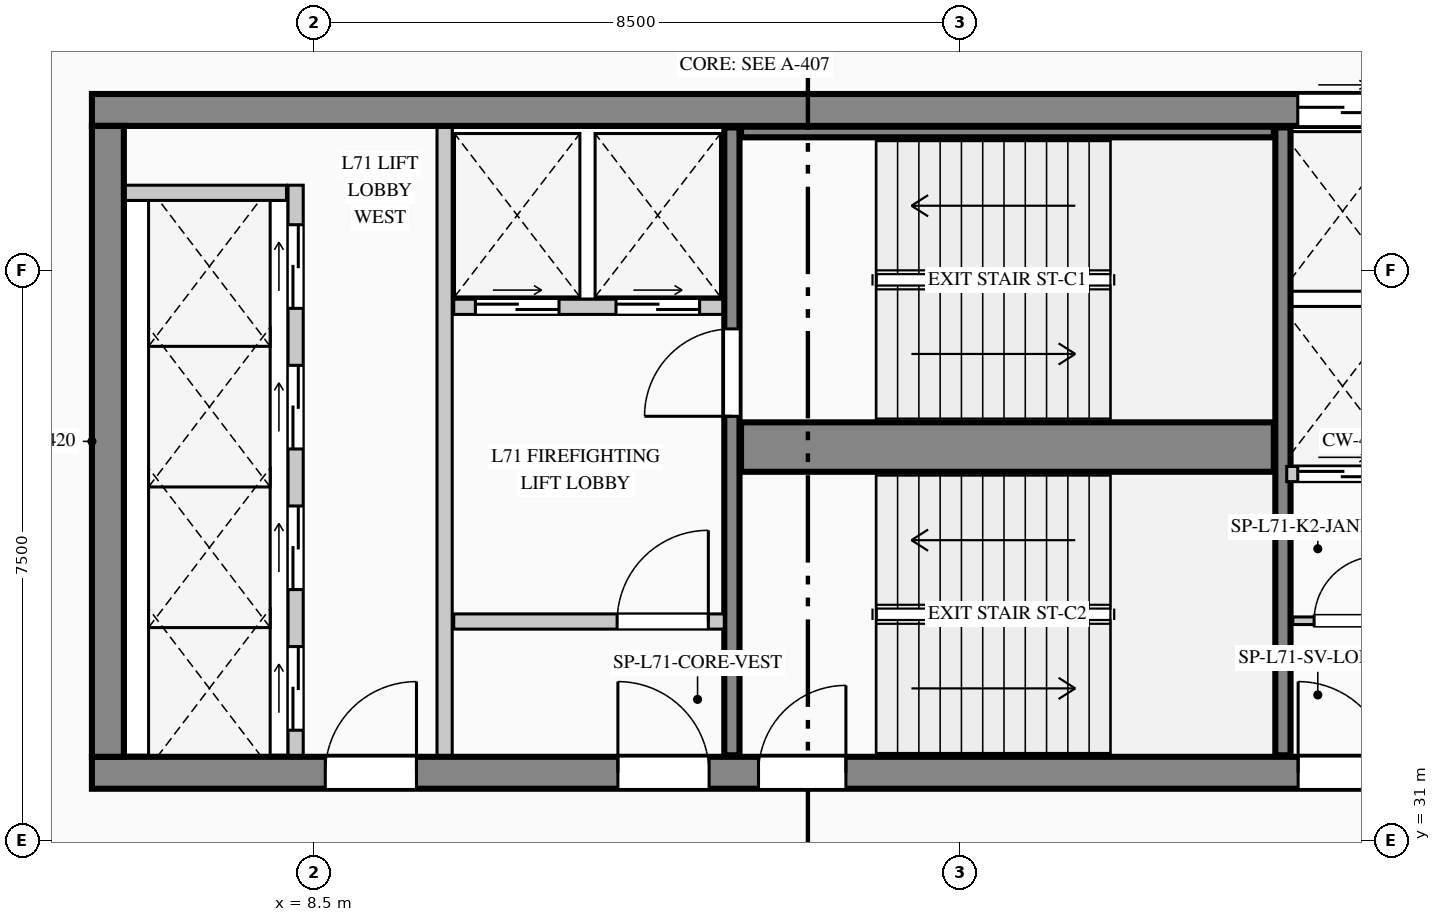
"""IFC4 building model, lengths in metres.
Left out: names, types, materials, properties, quantities, classifications, styles, units other than length and angle.
Written with IfcOpenShell. Run it as: python <this file> out.ifc"""

import sys

from ifc_helpers import new_model, si_unit, direction, frame, frame_2d, origin, place, context, subcontext, project, spatial, rectangle, extrude, element, fill, save


model = new_model("IFC4")
c1 = context("Model", 3, precision=1e-05, world=origin(), true_north=direction((0.0, 1.0)))
c2 = subcontext(c1, "Body", "Model", "MODEL_VIEW")
j1 = project(units=[si_unit("LENGTHUNIT", "METRE"), si_unit("PLANEANGLEUNIT", "RADIAN")], contexts=[c1])
p1 = place(None, origin())
s1 = spatial("IfcSite", under=j1, at=p1, CompositionType="ELEMENT")
p2 = place(p1, origin())
s2 = spatial("IfcBuilding", under=s1, at=p2, CompositionType="ELEMENT")
p3 = place(p2, frame((0.0, 0.0, 296.2)))
s3 = spatial("IfcBuildingStorey", under=s2, at=p3, CompositionType="ELEMENT", Elevation=296.2)
p4 = place(p3, frame((5.58, 40.61, 0.0), z_axis=(0.0, 0.0, 1.0), x_axis=(1.0, 0.0, 0.0)))
e1 = element("IfcWall", 1, at=p4, inside=s3, PredefinedType="SHEAR", context=c2, shape_type="SweptSolid", body=[
    extrude(rectangle(XDim=17.69, YDim=0.42, at=frame_2d((8.845, 0.0))), origin(), (0.0, 0.0, 1.0), 3.95),
])
p5 = place(p4, frame((15.865, 0.0, 0.0)))
e2 = element("IfcOpeningElement", 2, at=p5, cuts=e1, PredefinedType="OPENING", context=c2, shape_type="SweptSolid", body=[
    extrude(rectangle(XDim=1.18, YDim=2.25, at=frame_2d((0.59, 1.125))), frame((0.0, 0.22, 0.0), z_axis=(0.0, -1.0, 0.0), x_axis=(1.0, 0.0, 0.0)), (0.0, 0.0, 1.0), 0.44),
])
p6 = place(p3, frame((5.58, 31.89, 0.0), z_axis=(0.0, 0.0, 1.0), x_axis=(1.0, 0.0, 0.0)))
e3 = element("IfcWall", 3, at=p6, inside=s3, PredefinedType="SHEAR", context=c2, shape_type="SweptSolid", body=[
    extrude(rectangle(XDim=17.69, YDim=0.42, at=frame_2d((8.845, 0.0))), origin(), (0.0, 0.0, 1.0), 3.95),
])
p7 = place(p6, frame((3.07, 0.0, 0.0)))
e4 = element("IfcOpeningElement", 4, at=p7, cuts=e3, PredefinedType="OPENING", context=c2, shape_type="SweptSolid", body=[
    extrude(rectangle(XDim=1.2, YDim=2.2, at=frame_2d((0.6, 1.1))), frame((0.0, 0.22, 0.0), z_axis=(0.0, -1.0, 0.0), x_axis=(1.0, 0.0, 0.0)), (0.0, 0.0, 1.0), 0.44),
])
p8 = place(p6, frame((6.92, 0.0, 0.0)))
e5 = element("IfcOpeningElement", 5, at=p8, cuts=e3, PredefinedType="OPENING", context=c2, shape_type="SweptSolid", body=[
    extrude(rectangle(XDim=1.2, YDim=2.2, at=frame_2d((0.6, 1.1))), frame((0.0, 0.22, 0.0), z_axis=(0.0, -1.0, 0.0), x_axis=(1.0, 0.0, 0.0)), (0.0, 0.0, 1.0), 0.44),
])
p9 = place(p6, frame((8.77, 0.0, 0.0)))
e6 = element("IfcOpeningElement", 6, at=p9, cuts=e3, PredefinedType="OPENING", context=c2, shape_type="SweptSolid", body=[
    extrude(rectangle(XDim=1.15, YDim=2.2, at=frame_2d((0.575, 1.1))), frame((0.0, 0.22, 0.0), z_axis=(0.0, -1.0, 0.0), x_axis=(1.0, 0.0, 0.0)), (0.0, 0.0, 1.0), 0.44),
])
p10 = place(p6, frame((15.87, 0.0, 0.0)))
e7 = element("IfcOpeningElement", 7, at=p10, cuts=e3, PredefinedType="OPENING", context=c2, shape_type="SweptSolid", body=[
    extrude(rectangle(XDim=1.2, YDim=2.2, at=frame_2d((0.6, 1.1))), frame((0.0, 0.22, 0.0), z_axis=(0.0, -1.0, 0.0), x_axis=(1.0, 0.0, 0.0)), (0.0, 0.0, 1.0), 0.44),
])
p11 = place(p3, frame((5.79, 32.1, 0.0), z_axis=(0.0, 0.0, 1.0), x_axis=(0.0, 1.0, 0.0)))
e8 = element("IfcWall", 8, at=p11, inside=s3, PredefinedType="SHEAR", context=c2, shape_type="SweptSolid", body=[
    extrude(rectangle(XDim=8.3, YDim=0.42, at=frame_2d((4.15, 0.0))), origin(), (0.0, 0.0, 1.0), 3.95),
])
p12 = place(p3, frame((14.0, 32.12, 0.0), z_axis=(0.0, 0.0, 1.0), x_axis=(0.0, 1.0, 0.0)))
e9 = element("IfcWall", 9, at=p12, inside=s3, PredefinedType="SHEAR", context=c2, shape_type="SweptSolid", body=[
    extrude(rectangle(XDim=8.26, YDim=0.2, at=frame_2d((4.13, 0.0))), origin(), (0.0, 0.0, 1.0), 3.95),
])
p13 = place(p12, frame((4.46, 0.0, 0.0)))
e10 = element("IfcOpeningElement", 10, at=p13, cuts=e9, PredefinedType="OPENING", context=c2, shape_type="SweptSolid", body=[
    extrude(rectangle(XDim=1.15, YDim=2.2, at=frame_2d((0.575, 1.1))), frame((0.0, 0.11, 0.0), z_axis=(0.0, -1.0, 0.0), x_axis=(1.0, 0.0, 0.0)), (0.0, 0.0, 1.0), 0.22),
])
p14 = place(p3, frame((14.12, 36.175, 0.0), z_axis=(0.0, 0.0, 1.0), x_axis=(1.0, 0.0, 0.0)))
e11 = element("IfcWall", 11, at=p14, inside=s3, PredefinedType="SHEAR", context=c2, shape_type="SweptSolid", body=[
    extrude(rectangle(XDim=7.01, YDim=0.65, at=frame_2d((3.505, 0.0))), origin(), (0.0, 0.0, 1.0), 3.95),
])
p15 = place(p3, frame((21.25, 32.12, 0.0), z_axis=(0.0, 0.0, 1.0), x_axis=(0.0, 1.0, 0.0)))
e12 = element("IfcWall", 12, at=p15, inside=s3, PredefinedType="SHEAR", context=c2, shape_type="SweptSolid", body=[
    extrude(rectangle(XDim=8.26, YDim=0.2, at=frame_2d((4.13, 0.0))), origin(), (0.0, 0.0, 1.0), 3.95),
])
p16 = place(p3, frame((14.12, 40.32, 0.0), z_axis=(0.0, 0.0, 1.0), x_axis=(1.0, 0.0, 0.0)))
e13 = element("IfcWall", 13, at=p16, inside=s3, PredefinedType="SHEAR", context=c2, shape_type="SweptSolid", body=[
    extrude(rectangle(XDim=7.01, YDim=0.14, at=frame_2d((3.505, 0.0))), origin(), (0.0, 0.0, 1.0), 3.95),
])
p17 = place(p3, frame((5.6, 4.32, 0.0), z_axis=(0.0, 0.0, 1.0), x_axis=(-0.075839920993, 0.997120006009, 0.0)))
e14 = element("IfcWall", 14, at=p17, inside=s3, PredefinedType="STANDARD", context=c2, shape_type="SweptSolid", body=[
    extrude(rectangle(XDim=37.468, YDim=0.24, at=frame_2d((18.734, 0.0))), origin(), (0.0, 0.0, 1.0), 3.7),
])
p18 = place(p17, frame((23.154, 0.0, 0.9)))
e15 = element("IfcOpeningElement", 15, at=p18, cuts=e14, PredefinedType="OPENING", context=c2, shape_type="SweptSolid", body=[
    extrude(rectangle(XDim=1.65, YDim=1.95, at=frame_2d((0.825, 0.975))), frame((0.0, 0.13, 0.0), z_axis=(0.0, -1.0, 0.0), x_axis=(1.0, 0.0, 0.0)), (0.0, 0.0, 1.0), 0.26),
])
p19 = place(p3, frame((8.26, 32.12, 0.0), z_axis=(0.0, 0.0, 1.0), x_axis=(0.0, 1.0, 0.0)))
e16 = element("IfcWall", 16, at=p19, inside=s3, PredefinedType="PARTITIONING", context=c2, shape_type="SweptSolid", body=[
    extrude(rectangle(XDim=7.5, YDim=0.2, at=frame_2d((3.75, 0.0))), origin(), (0.0, 0.0, 1.0), 3.7),
])
p20 = place(p19, frame((0.33, 0.0, 0.0)))
e17 = element("IfcOpeningElement", 17, at=p20, cuts=e16, PredefinedType="OPENING", context=c2, shape_type="SweptSolid", body=[
    extrude(rectangle(XDim=1.1, YDim=2.2, at=frame_2d((0.55, 1.1))), frame((0.0, 0.11, 0.0), z_axis=(0.0, -1.0, 0.0), x_axis=(1.0, 0.0, 0.0)), (0.0, 0.0, 1.0), 0.22),
])
p21 = place(p19, frame((2.18, 0.0, 0.0)))
e18 = element("IfcOpeningElement", 18, at=p21, cuts=e16, PredefinedType="OPENING", context=c2, shape_type="SweptSolid", body=[
    extrude(rectangle(XDim=1.1, YDim=2.2, at=frame_2d((0.55, 1.1))), frame((0.0, 0.11, 0.0), z_axis=(0.0, -1.0, 0.0), x_axis=(1.0, 0.0, 0.0)), (0.0, 0.0, 1.0), 0.22),
])
p22 = place(p19, frame((4.03, 0.0, 0.0)))
e19 = element("IfcOpeningElement", 19, at=p22, cuts=e16, PredefinedType="OPENING", context=c2, shape_type="SweptSolid", body=[
    extrude(rectangle(XDim=1.1, YDim=2.2, at=frame_2d((0.55, 1.1))), frame((0.0, 0.11, 0.0), z_axis=(0.0, -1.0, 0.0), x_axis=(1.0, 0.0, 0.0)), (0.0, 0.0, 1.0), 0.22),
])
p23 = place(p19, frame((5.88, 0.0, 0.0)))
e20 = element("IfcOpeningElement", 20, at=p23, cuts=e16, PredefinedType="OPENING", context=c2, shape_type="SweptSolid", body=[
    extrude(rectangle(XDim=1.1, YDim=2.2, at=frame_2d((0.55, 1.1))), frame((0.0, 0.11, 0.0), z_axis=(0.0, -1.0, 0.0), x_axis=(1.0, 0.0, 0.0)), (0.0, 0.0, 1.0), 0.22),
])
p24 = place(p3, frame((6.02, 39.52, 0.0), z_axis=(0.0, 0.0, 1.0), x_axis=(1.0, 0.0, 0.0)))
e21 = element("IfcWall", 21, at=p24, inside=s3, PredefinedType="PARTITIONING", context=c2, shape_type="SweptSolid", body=[
    extrude(rectangle(XDim=2.12, YDim=0.2, at=frame_2d((1.06, 0.0))), origin(), (0.0, 0.0, 1.0), 3.7),
])
p25 = place(p3, frame((10.22, 32.12, 0.0), z_axis=(0.0, 0.0, 1.0), x_axis=(0.0, 1.0, 0.0)))
e22 = element("IfcWall", 22, at=p25, inside=s3, PredefinedType="PARTITIONING", context=c2, shape_type="SweptSolid", body=[
    extrude(rectangle(XDim=8.26, YDim=0.2, at=frame_2d((4.13, 0.0))), origin(), (0.0, 0.0, 1.0), 3.7),
])
p26 = place(p3, frame((10.34, 38.02, 0.0), z_axis=(0.0, 0.0, 1.0), x_axis=(1.0, 0.0, 0.0)))
e23 = element("IfcWall", 23, at=p26, inside=s3, PredefinedType="PARTITIONING", context=c2, shape_type="SweptSolid", body=[
    extrude(rectangle(XDim=3.54, YDim=0.2, at=frame_2d((1.77, 0.0))), origin(), (0.0, 0.0, 1.0), 3.7),
])
p27 = place(p26, frame((0.285, 0.0, 0.0)))
e24 = element("IfcOpeningElement", 24, at=p27, cuts=e23, PredefinedType="OPENING", context=c2, shape_type="SweptSolid", body=[
    extrude(rectangle(XDim=1.1, YDim=2.2, at=frame_2d((0.55, 1.1))), frame((0.0, 0.11, 0.0), z_axis=(0.0, -1.0, 0.0), x_axis=(1.0, 0.0, 0.0)), (0.0, 0.0, 1.0), 0.22),
])
p28 = place(p26, frame((2.135, 0.0, 0.0)))
e25 = element("IfcOpeningElement", 25, at=p28, cuts=e23, PredefinedType="OPENING", context=c2, shape_type="SweptSolid", body=[
    extrude(rectangle(XDim=1.1, YDim=2.2, at=frame_2d((0.55, 1.1))), frame((0.0, 0.11, 0.0), z_axis=(0.0, -1.0, 0.0), x_axis=(1.0, 0.0, 0.0)), (0.0, 0.0, 1.0), 0.22),
])
p29 = place(p3, frame((10.34, 33.88, 0.0), z_axis=(0.0, 0.0, 1.0), x_axis=(1.0, 0.0, 0.0)))
e26 = element("IfcWall", 26, at=p29, inside=s3, PredefinedType="PARTITIONING", context=c2, shape_type="SweptSolid", body=[
    extrude(rectangle(XDim=3.56, YDim=0.2, at=frame_2d((1.78, 0.0))), origin(), (0.0, 0.0, 1.0), 3.7),
])
p30 = place(p29, frame((2.15, 0.0, 0.0)))
e27 = element("IfcOpeningElement", 27, at=p30, cuts=e26, PredefinedType="OPENING", context=c2, shape_type="SweptSolid", body=[
    extrude(rectangle(XDim=1.2, YDim=2.2, at=frame_2d((0.6, 1.1))), frame((0.0, 0.11, 0.0), z_axis=(0.0, -1.0, 0.0), x_axis=(1.0, 0.0, 0.0)), (0.0, 0.0, 1.0), 0.22),
])
p31 = place(p3, frame((21.38, 33.89, 0.0), z_axis=(0.0, 0.0, 1.0), x_axis=(1.0, 0.0, 0.0)))
e28 = element("IfcWall", 28, at=p31, inside=s3, PredefinedType="PARTITIONING", context=c2, shape_type="SweptSolid", body=[
    extrude(rectangle(XDim=1.42, YDim=0.1, at=frame_2d((0.71, 0.0))), origin(), (0.0, 0.0, 1.0), 3.7),
])
p32 = place(p31, frame((0.28, 0.0, 0.0)))
e29 = element("IfcOpeningElement", 29, at=p32, cuts=e28, PredefinedType="OPENING", context=c2, shape_type="SweptSolid", body=[
    extrude(rectangle(XDim=0.85, YDim=2.1, at=frame_2d((0.425, 1.05))), frame((0.0, 0.06, 0.0), z_axis=(0.0, -1.0, 0.0), x_axis=(1.0, 0.0, 0.0)), (0.0, 0.0, 1.0), 0.12),
])
p33 = place(p3, frame((21.3, 35.82, 0.0), z_axis=(0.0, 0.0, 1.0), x_axis=(1.0, 0.0, 0.0)))
e30 = element("IfcWall", 30, at=p33, inside=s3, PredefinedType="PARTITIONING", context=c2, shape_type="SweptSolid", body=[
    extrude(rectangle(XDim=1.5, YDim=0.2, at=frame_2d((0.75, 0.0))), origin(), (0.0, 0.0, 1.0), 3.7),
])
p34 = place(p33, frame((0.145, 0.0, 0.0)))
e31 = element("IfcOpeningElement", 31, at=p34, cuts=e30, PredefinedType="OPENING", context=c2, shape_type="SweptSolid", body=[
    extrude(rectangle(XDim=1.18, YDim=2.25, at=frame_2d((0.59, 1.125))), frame((0.0, 0.11, 0.0), z_axis=(0.0, -1.0, 0.0), x_axis=(1.0, 0.0, 0.0)), (0.0, 0.0, 1.0), 0.22),
])
p35 = place(p7, origin())
e32 = element("IfcDoor", 32, at=p35, inside=s3, OperationType="SINGLE_SWING_RIGHT", PredefinedType="DOOR", context=c2, shape_type="SweptSolid", body=[
    extrude(rectangle(XDim=1.2, YDim=2.2, at=frame_2d((0.6, 1.1))), frame((0.0, 0.025, 0.0), z_axis=(0.0, -1.0, 0.0), x_axis=(1.0, 0.0, 0.0)), (0.0, 0.0, 1.0), 0.05),
])
fill(e4, e32)
p36 = place(p8, origin())
e33 = element("IfcDoor", 33, at=p36, inside=s3, OperationType="SINGLE_SWING_LEFT", PredefinedType="DOOR", context=c2, shape_type="SweptSolid", body=[
    extrude(rectangle(XDim=1.2, YDim=2.2, at=frame_2d((0.6, 1.1))), frame((0.0, 0.025, 0.0), z_axis=(0.0, -1.0, 0.0), x_axis=(1.0, 0.0, 0.0)), (0.0, 0.0, 1.0), 0.05),
])
fill(e5, e33)
p37 = place(p9, origin())
e34 = element("IfcDoor", 34, at=p37, inside=s3, OperationType="SINGLE_SWING_RIGHT", PredefinedType="DOOR", context=c2, shape_type="SweptSolid", body=[
    extrude(rectangle(XDim=1.15, YDim=2.2, at=frame_2d((0.575, 1.1))), frame((0.0, 0.025, 0.0), z_axis=(0.0, -1.0, 0.0), x_axis=(1.0, 0.0, 0.0)), (0.0, 0.0, 1.0), 0.05),
])
fill(e6, e34)
p38 = place(p10, origin())
e35 = element("IfcDoor", 35, at=p38, inside=s3, OperationType="SINGLE_SWING_LEFT", PredefinedType="DOOR", context=c2, shape_type="SweptSolid", body=[
    extrude(rectangle(XDim=1.2, YDim=2.2, at=frame_2d((0.6, 1.1))), frame((0.0, 0.025, 0.0), z_axis=(0.0, -1.0, 0.0), x_axis=(1.0, 0.0, 0.0)), (0.0, 0.0, 1.0), 0.05),
])
fill(e7, e35)
p39 = place(p30, origin())
e36 = element("IfcDoor", 36, at=p39, inside=s3, OperationType="SINGLE_SWING_RIGHT", PredefinedType="DOOR", context=c2, shape_type="SweptSolid", body=[
    extrude(rectangle(XDim=1.2, YDim=2.2, at=frame_2d((0.6, 1.1))), frame((0.0, 0.025, 0.0), z_axis=(0.0, -1.0, 0.0), x_axis=(1.0, 0.0, 0.0)), (0.0, 0.0, 1.0), 0.05),
])
fill(e27, e36)
p40 = place(p32, origin())
e37 = element("IfcDoor", 37, at=p40, inside=s3, OperationType="SINGLE_SWING_RIGHT", PredefinedType="DOOR", context=c2, shape_type="SweptSolid", body=[
    extrude(rectangle(XDim=0.85, YDim=2.1, at=frame_2d((0.425, 1.05))), frame((0.0, 0.025, 0.0), z_axis=(0.0, -1.0, 0.0), x_axis=(1.0, 0.0, 0.0)), (0.0, 0.0, 1.0), 0.05),
])
fill(e29, e37)
p41 = place(p13, origin())
e38 = element("IfcDoor", 38, at=p41, inside=s3, OperationType="SINGLE_SWING_LEFT", PredefinedType="DOOR", context=c2, shape_type="SweptSolid", body=[
    extrude(rectangle(XDim=1.15, YDim=2.2, at=frame_2d((0.575, 1.1))), frame((0.0, 0.025, 0.0), z_axis=(0.0, -1.0, 0.0), x_axis=(1.0, 0.0, 0.0)), (0.0, 0.0, 1.0), 0.05),
])
fill(e10, e38)
p42 = place(p20, origin())
e39 = element("IfcDoor", 39, at=p42, inside=s3, OperationType="DOUBLE_DOOR_SLIDING", PredefinedType="DOOR", context=c2, shape_type="SweptSolid", body=[
    extrude(rectangle(XDim=1.1, YDim=2.2, at=frame_2d((0.55, 1.1))), frame((0.0, 0.025, 0.0), z_axis=(0.0, -1.0, 0.0), x_axis=(1.0, 0.0, 0.0)), (0.0, 0.0, 1.0), 0.05),
])
fill(e17, e39)
p43 = place(p21, origin())
e40 = element("IfcDoor", 40, at=p43, inside=s3, OperationType="DOUBLE_DOOR_SLIDING", PredefinedType="DOOR", context=c2, shape_type="SweptSolid", body=[
    extrude(rectangle(XDim=1.1, YDim=2.2, at=frame_2d((0.55, 1.1))), frame((0.0, 0.025, 0.0), z_axis=(0.0, -1.0, 0.0), x_axis=(1.0, 0.0, 0.0)), (0.0, 0.0, 1.0), 0.05),
])
fill(e18, e40)
p44 = place(p22, origin())
e41 = element("IfcDoor", 41, at=p44, inside=s3, OperationType="DOUBLE_DOOR_SLIDING", PredefinedType="DOOR", context=c2, shape_type="SweptSolid", body=[
    extrude(rectangle(XDim=1.1, YDim=2.2, at=frame_2d((0.55, 1.1))), frame((0.0, 0.025, 0.0), z_axis=(0.0, -1.0, 0.0), x_axis=(1.0, 0.0, 0.0)), (0.0, 0.0, 1.0), 0.05),
])
fill(e19, e41)
p45 = place(p23, origin())
e42 = element("IfcDoor", 42, at=p45, inside=s3, OperationType="DOUBLE_DOOR_SLIDING", PredefinedType="DOOR", context=c2, shape_type="SweptSolid", body=[
    extrude(rectangle(XDim=1.1, YDim=2.2, at=frame_2d((0.55, 1.1))), frame((0.0, 0.025, 0.0), z_axis=(0.0, -1.0, 0.0), x_axis=(1.0, 0.0, 0.0)), (0.0, 0.0, 1.0), 0.05),
])
fill(e20, e42)
p46 = place(p27, origin())
e43 = element("IfcDoor", 43, at=p46, inside=s3, OperationType="DOUBLE_DOOR_SLIDING", PredefinedType="DOOR", context=c2, shape_type="SweptSolid", body=[
    extrude(rectangle(XDim=1.1, YDim=2.2, at=frame_2d((0.55, 1.1))), frame((0.0, 0.025, 0.0), z_axis=(0.0, -1.0, 0.0), x_axis=(1.0, 0.0, 0.0)), (0.0, 0.0, 1.0), 0.05),
])
fill(e24, e43)
p47 = place(p28, origin())
e44 = element("IfcDoor", 44, at=p47, inside=s3, OperationType="DOUBLE_DOOR_SLIDING", PredefinedType="DOOR", context=c2, shape_type="SweptSolid", body=[
    extrude(rectangle(XDim=1.1, YDim=2.2, at=frame_2d((0.55, 1.1))), frame((0.0, 0.025, 0.0), z_axis=(0.0, -1.0, 0.0), x_axis=(1.0, 0.0, 0.0)), (0.0, 0.0, 1.0), 0.05),
])
fill(e25, e44)
p48 = place(p5, origin())
e45 = element("IfcDoor", 45, at=p48, inside=s3, OperationType="DOUBLE_DOOR_SLIDING", PredefinedType="DOOR", context=c2, shape_type="SweptSolid", body=[
    extrude(rectangle(XDim=1.18, YDim=2.25, at=frame_2d((0.59, 1.125))), frame((0.0, 0.025, 0.0), z_axis=(0.0, -1.0, 0.0), x_axis=(1.0, 0.0, 0.0)), (0.0, 0.0, 1.0), 0.05),
])
fill(e2, e45)
p49 = place(p34, origin())
e46 = element("IfcDoor", 46, at=p49, inside=s3, OperationType="DOUBLE_DOOR_SLIDING", PredefinedType="DOOR", context=c2, shape_type="SweptSolid", body=[
    extrude(rectangle(XDim=1.18, YDim=2.25, at=frame_2d((0.59, 1.125))), frame((0.0, 0.025, 0.0), z_axis=(0.0, -1.0, 0.0), x_axis=(1.0, 0.0, 0.0)), (0.0, 0.0, 1.0), 0.05),
])
fill(e31, e46)
save(model, sys.argv[1])
